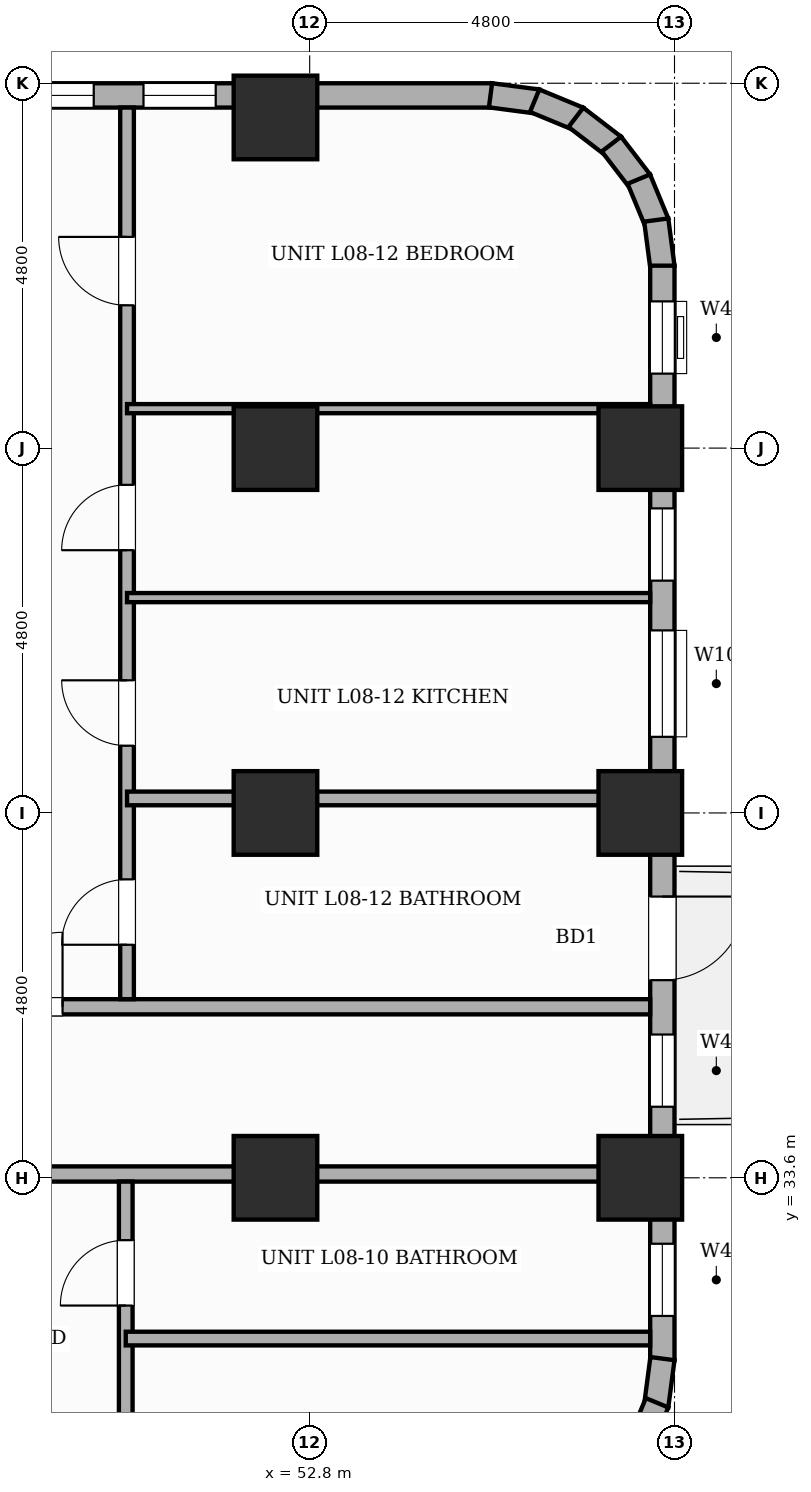
"""IFC4 building model, lengths in metres.
Left out: names, types, materials, properties, quantities, classifications, styles, units other than length and angle.
Written with IfcOpenShell. Run it as: python <this file> out.ifc"""

import sys

from ifc_helpers import new_model, si_unit, direction, frame, frame_2d, origin, origin_2d, place, context, subcontext, project, spatial, rectangle, extrude, element, fill, save


model = new_model("IFC4")
c1 = context("Model", 3, precision=1e-05, world=origin(), true_north=direction((0.0, 1.0)))
c2 = subcontext(c1, "Body", "Model", "MODEL_VIEW")
j1 = project(units=[si_unit("LENGTHUNIT", "METRE"), si_unit("PLANEANGLEUNIT", "RADIAN")], contexts=[c1])
p1 = place(None, origin())
s1 = spatial("IfcSite", under=j1, at=p1, CompositionType="ELEMENT")
p2 = place(p1, origin())
s2 = spatial("IfcBuilding", under=s1, at=p2, CompositionType="ELEMENT")
p3 = place(p2, frame((0.0, 0.0, 35.8)))
s3 = spatial("IfcBuildingStorey", under=s2, at=p3, CompositionType="ELEMENT", Elevation=35.8)
for number, where, z_axis, x_axis in (
    (1, (52.35, 33.6, 0.0), (0.0, 0.0, 1.0), (1.0, 0.0, 0.0)),
    (2, (52.35, 38.4, 0.0), (0.0, 0.0, 1.0), (1.0, 0.0, 0.0)),
    (3, (52.35, 43.2, 0.0), (0.0, 0.0, 1.0), (1.0, 0.0, 0.0)),
    (4, (52.35, 47.55, 0.0), (0.0, 0.0, 1.0), (1.0, 0.0, 0.0)),
    (5, (57.15, 33.6, 0.0), (0.0, 0.0, 1.0), (1.0, 0.0, 0.0)),
    (6, (57.15, 38.4, 0.0), (0.0, 0.0, 1.0), (1.0, 0.0, 0.0)),
    (7, (57.15, 43.2, 0.0), (0.0, 0.0, 1.0), (1.0, 0.0, 0.0)),
):
    element("IfcColumn", number, at=place(p3, frame(where, z_axis=z_axis, x_axis=x_axis)), inside=s3, PredefinedType="COLUMN", context=c2, shape_type="SweptSolid", body=[
        extrude(rectangle(XDim=1.1, YDim=1.1, at=origin_2d()), origin(), (0.0, 0.0, 1.0), 3.6),
    ])
p4 = place(p3, frame((7.2, 47.84, 0.0), z_axis=(0.0, 0.0, 1.0), x_axis=(1.0, 0.0, 0.0)))
e8 = element("IfcWall", 8, at=p4, inside=s3, PredefinedType="STANDARD", context=c2, shape_type="SweptSolid", body=[
    extrude(rectangle(XDim=48.0, YDim=0.32, at=frame_2d((24.0, 0.0))), origin(), (0.0, 0.0, 1.0), 2.53),
])
p5 = place(p4, frame((28.803, 0.0, 0.65)))
e9 = element("IfcOpeningElement", 9, at=p5, cuts=e8, PredefinedType="OPENING", context=c2, shape_type="SweptSolid", body=[
    extrude(rectangle(XDim=1.4, YDim=1.1, at=frame_2d((0.7, 0.55))), frame((0.0, 0.17, 0.0), z_axis=(0.0, -1.0, 0.0), x_axis=(1.0, 0.0, 0.0)), (0.0, 0.0, 1.0), 0.34),
])
p6 = place(p4, frame((43.414, 0.0, 0.45)))
e10 = element("IfcOpeningElement", 10, at=p6, cuts=e8, PredefinedType="OPENING", context=c2, shape_type="SweptSolid", body=[
    extrude(rectangle(XDim=0.95, YDim=1.8, at=frame_2d((0.475, 0.9))), frame((0.0, 0.17, 0.0), z_axis=(0.0, -1.0, 0.0), x_axis=(1.0, 0.0, 0.0)), (0.0, 0.0, 1.0), 0.34),
])
p7 = place(p4, frame((18.74, 0.0, 0.45)))
e11 = element("IfcOpeningElement", 11, at=p7, cuts=e8, PredefinedType="OPENING", context=c2, shape_type="SweptSolid", body=[
    extrude(rectangle(XDim=0.95, YDim=1.8, at=frame_2d((0.475, 0.9))), frame((0.0, 0.17, 0.0), z_axis=(0.0, -1.0, 0.0), x_axis=(1.0, 0.0, 0.0)), (0.0, 0.0, 1.0), 0.34),
])
p8 = place(p4, frame((37.825, 0.0, 0.65)))
e12 = element("IfcOpeningElement", 12, at=p8, cuts=e8, PredefinedType="OPENING", context=c2, shape_type="SweptSolid", body=[
    extrude(rectangle(XDim=1.4, YDim=1.1, at=frame_2d((0.7, 0.55))), frame((0.0, 0.17, 0.0), z_axis=(0.0, -1.0, 0.0), x_axis=(1.0, 0.0, 0.0)), (0.0, 0.0, 1.0), 0.34),
])
p9 = place(p4, frame((0.47, 0.0, 0.45)))
e13 = element("IfcOpeningElement", 13, at=p9, cuts=e8, PredefinedType="OPENING", context=c2, shape_type="SweptSolid", body=[
    extrude(rectangle(XDim=0.95, YDim=1.8, at=frame_2d((0.475, 0.9))), frame((0.0, 0.17, 0.0), z_axis=(0.0, -1.0, 0.0), x_axis=(1.0, 0.0, 0.0)), (0.0, 0.0, 1.0), 0.34),
])
p10 = place(p4, frame((5.265, 0.0, 0.45)))
e14 = element("IfcOpeningElement", 14, at=p10, cuts=e8, PredefinedType="OPENING", context=c2, shape_type="SweptSolid", body=[
    extrude(rectangle(XDim=0.95, YDim=1.8, at=frame_2d((0.475, 0.9))), frame((0.0, 0.17, 0.0), z_axis=(0.0, -1.0, 0.0), x_axis=(1.0, 0.0, 0.0)), (0.0, 0.0, 1.0), 0.34),
])
p11 = place(p4, frame((23.43, 0.0, 0.65)))
e15 = element("IfcOpeningElement", 15, at=p11, cuts=e8, PredefinedType="OPENING", context=c2, shape_type="SweptSolid", body=[
    extrude(rectangle(XDim=1.4, YDim=1.1, at=frame_2d((0.7, 0.55))), frame((0.0, 0.17, 0.0), z_axis=(0.0, -1.0, 0.0), x_axis=(1.0, 0.0, 0.0)), (0.0, 0.0, 1.0), 0.34),
])
p12 = place(p4, frame((41.809, 0.0, 0.45)))
e16 = element("IfcOpeningElement", 16, at=p12, cuts=e8, PredefinedType="OPENING", context=c2, shape_type="SweptSolid", body=[
    extrude(rectangle(XDim=0.95, YDim=1.8, at=frame_2d((0.475, 0.9))), frame((0.0, 0.17, 0.0), z_axis=(0.0, -1.0, 0.0), x_axis=(1.0, 0.0, 0.0)), (0.0, 0.0, 1.0), 0.34),
])
for number, where, z_axis, x_axis in (
    (17, (55.179, 47.841, 0.0), (0.0, 0.0, 1.0), (0.991, -0.131, 0.0)),
    (18, (55.76, 47.771, 0.0), (0.0, 0.0, 1.0), (0.924, -0.383, 0.0)),
):
    element("IfcWall", number, at=place(p3, frame(where, z_axis=z_axis, x_axis=x_axis)), inside=s3, PredefinedType="STANDARD", context=c2, shape_type="SweptSolid", body=[
        extrude(rectangle(XDim=0.626, YDim=0.32, at=frame_2d((0.313, 0.0))), origin(), (0.0, 0.0, 1.0), 3.35),
    ])
p13 = place(p3, frame((56.302, 47.552, 0.0), z_axis=(0.0, 0.0, 1.0), x_axis=(0.793549926411, -0.608505147302, 0.0)))
e19 = element("IfcWall", 19, at=p13, inside=s3, PredefinedType="STANDARD", context=c2, shape_type="SweptSolid", body=[
    extrude(rectangle(XDim=0.627, YDim=0.32, at=frame_2d((0.313, 0.0))), origin(), (0.0, 0.0, 1.0), 3.35),
])
for number, where, z_axis, x_axis in (
    (20, (56.77, 47.2, 0.0), (0.0, 0.0, 1.0), (0.609, -0.793, 0.0)),
    (21, (57.131, 46.739, 0.0), (0.0, 0.0, 1.0), (0.383, -0.924, 0.0)),
    (22, (57.36, 46.2, 0.0), (0.0, 0.0, 1.0), (0.131, -0.991, 0.0)),
):
    element("IfcWall", number, at=place(p3, frame(where, z_axis=z_axis, x_axis=x_axis)), inside=s3, PredefinedType="STANDARD", context=c2, shape_type="SweptSolid", body=[
        extrude(rectangle(XDim=0.626, YDim=0.32, at=frame_2d((0.313, 0.0))), origin(), (0.0, 0.0, 1.0), 3.35),
    ])
p14 = place(p3, frame((57.44, 45.6, 0.0), z_axis=(0.0, 0.0, 1.0), x_axis=(0.0, -1.0, 0.0)))
e23 = element("IfcWall", 23, at=p14, inside=s3, PredefinedType="STANDARD", context=c2, shape_type="SweptSolid", body=[
    extrude(rectangle(XDim=14.4, YDim=0.32, at=frame_2d((7.2, 0.0))), origin(), (0.0, 0.0, 1.0), 2.53),
])
p15 = place(p14, frame((8.3, 0.0, 0.0)))
e24 = element("IfcOpeningElement", 24, at=p15, cuts=e23, PredefinedType="OPENING", context=c2, shape_type="SweptSolid", body=[
    extrude(rectangle(XDim=1.1, YDim=2.15, at=frame_2d((0.55, 1.075))), frame((0.0, 0.17, 0.0), z_axis=(0.0, -1.0, 0.0), x_axis=(1.0, 0.0, 0.0)), (0.0, 0.0, 1.0), 0.34),
])
p16 = place(p14, frame((0.47, 0.0, 0.45)))
e25 = element("IfcOpeningElement", 25, at=p16, cuts=e23, PredefinedType="OPENING", context=c2, shape_type="SweptSolid", body=[
    extrude(rectangle(XDim=0.95, YDim=1.8, at=frame_2d((0.475, 0.9))), frame((0.0, 0.17, 0.0), z_axis=(0.0, -1.0, 0.0), x_axis=(1.0, 0.0, 0.0)), (0.0, 0.0, 1.0), 0.34),
])
p17 = place(p14, frame((10.115, 0.0, 0.45)))
e26 = element("IfcOpeningElement", 26, at=p17, cuts=e23, PredefinedType="OPENING", context=c2, shape_type="SweptSolid", body=[
    extrude(rectangle(XDim=0.95, YDim=1.8, at=frame_2d((0.475, 0.9))), frame((0.0, 0.17, 0.0), z_axis=(0.0, -1.0, 0.0), x_axis=(1.0, 0.0, 0.0)), (0.0, 0.0, 1.0), 0.34),
])
p18 = place(p14, frame((12.867, 0.0, 0.45)))
e27 = element("IfcOpeningElement", 27, at=p18, cuts=e23, PredefinedType="OPENING", context=c2, shape_type="SweptSolid", body=[
    extrude(rectangle(XDim=0.95, YDim=1.8, at=frame_2d((0.475, 0.9))), frame((0.0, 0.17, 0.0), z_axis=(0.0, -1.0, 0.0), x_axis=(1.0, 0.0, 0.0)), (0.0, 0.0, 1.0), 0.34),
])
p19 = place(p14, frame((4.799, 0.0, 0.65)))
e28 = element("IfcOpeningElement", 28, at=p19, cuts=e23, PredefinedType="OPENING", context=c2, shape_type="SweptSolid", body=[
    extrude(rectangle(XDim=1.4, YDim=1.1, at=frame_2d((0.7, 0.55))), frame((0.0, 0.17, 0.0), z_axis=(0.0, -1.0, 0.0), x_axis=(1.0, 0.0, 0.0)), (0.0, 0.0, 1.0), 0.34),
])
p20 = place(p14, frame((3.194, 0.0, 0.45)))
e29 = element("IfcOpeningElement", 29, at=p20, cuts=e23, PredefinedType="OPENING", context=c2, shape_type="SweptSolid", body=[
    extrude(rectangle(XDim=0.95, YDim=1.8, at=frame_2d((0.475, 0.9))), frame((0.0, 0.17, 0.0), z_axis=(0.0, -1.0, 0.0), x_axis=(1.0, 0.0, 0.0)), (0.0, 0.0, 1.0), 0.34),
])
p21 = place(p3, frame((57.441, 31.221, 0.0), z_axis=(0.0, 0.0, 1.0), x_axis=(-0.130504898859, -0.991447664465, 0.0)))
e30 = element("IfcWall", 30, at=p21, inside=s3, PredefinedType="STANDARD", context=c2, shape_type="SweptSolid", body=[
    extrude(rectangle(XDim=0.627, YDim=0.32, at=frame_2d((0.313, 0.0))), origin(), (0.0, 0.0, 1.0), 3.35),
])
p22 = place(p3, frame((57.37, 30.64, 0.0), z_axis=(0.0, 0.0, 1.0), x_axis=(-0.382787856107, -0.923836271867, 0.0)))
e31 = element("IfcWall", 31, at=p22, inside=s3, PredefinedType="STANDARD", context=c2, shape_type="SweptSolid", body=[
    extrude(rectangle(XDim=0.626, YDim=0.32, at=frame_2d((0.313, 0.0))), origin(), (0.0, 0.0, 1.0), 3.35),
])
p23 = place(p3, frame((22.75, 33.65, 0.0), z_axis=(0.0, 0.0, 1.0), x_axis=(1.0, 0.0, 0.0)))
e32 = element("IfcWall", 32, at=p23, inside=s3, PredefinedType="PARTITIONING", context=c2, shape_type="SweptSolid", body=[
    extrude(rectangle(XDim=34.53, YDim=0.2, at=frame_2d((17.265, 0.0))), origin(), (0.0, 0.0, 1.0), 2.53),
])
p24 = place(p23, frame((6.491, 0.0, 0.0)))
e33 = element("IfcOpeningElement", 33, at=p24, cuts=e32, PredefinedType="OPENING", context=c2, shape_type="SweptSolid", body=[
    extrude(rectangle(XDim=0.98, YDim=2.18, at=frame_2d((0.49, 1.09))), frame((0.0, 0.11, 0.0), z_axis=(0.0, -1.0, 0.0), x_axis=(1.0, 0.0, 0.0)), (0.0, 0.0, 1.0), 0.22),
])
p25 = place(p23, frame((13.406, 0.0, 0.0)))
e34 = element("IfcOpeningElement", 34, at=p25, cuts=e32, PredefinedType="OPENING", context=c2, shape_type="SweptSolid", body=[
    extrude(rectangle(XDim=0.98, YDim=2.18, at=frame_2d((0.49, 1.09))), frame((0.0, 0.11, 0.0), z_axis=(0.0, -1.0, 0.0), x_axis=(1.0, 0.0, 0.0)), (0.0, 0.0, 1.0), 0.22),
])
p26 = place(p23, frame((24.09, 0.0, 0.0)))
e35 = element("IfcOpeningElement", 35, at=p26, cuts=e32, PredefinedType="OPENING", context=c2, shape_type="SweptSolid", body=[
    extrude(rectangle(XDim=0.98, YDim=2.18, at=frame_2d((0.49, 1.09))), frame((0.0, 0.11, 0.0), z_axis=(0.0, -1.0, 0.0), x_axis=(1.0, 0.0, 0.0)), (0.0, 0.0, 1.0), 0.22),
])
p27 = place(p3, frame((44.02, 35.85, 0.0), z_axis=(0.0, 0.0, 1.0), x_axis=(1.0, 0.0, 0.0)))
e36 = element("IfcWall", 36, at=p27, inside=s3, PredefinedType="PARTITIONING", context=c2, shape_type="SweptSolid", body=[
    extrude(rectangle(XDim=13.26, YDim=0.2, at=frame_2d((6.63, 0.0))), origin(), (0.0, 0.0, 1.0), 3.35),
])
p28 = place(p27, frame((4.549, 0.0, 0.0)))
e37 = element("IfcOpeningElement", 37, at=p28, cuts=e36, PredefinedType="OPENING", context=c2, shape_type="SweptSolid", body=[
    extrude(rectangle(XDim=0.98, YDim=2.18, at=frame_2d((0.49, 1.09))), frame((0.0, 0.11, 0.0), z_axis=(0.0, -1.0, 0.0), x_axis=(1.0, 0.0, 0.0)), (0.0, 0.0, 1.0), 0.22),
])
p29 = place(p3, frame((50.38, 29.12, 0.0), z_axis=(0.0, 0.0, 1.0), x_axis=(0.0, 1.0, 0.0)))
e38 = element("IfcWall", 38, at=p29, inside=s3, PredefinedType="PLUMBINGWALL", context=c2, shape_type="SweptSolid", body=[
    extrude(rectangle(XDim=4.43, YDim=0.18, at=frame_2d((2.215, 0.0))), origin(), (0.0, 0.0, 1.0), 3.35),
])
p30 = place(p29, frame((0.459, 0.0, 0.0)))
e39 = element("IfcOpeningElement", 39, at=p30, cuts=e38, PredefinedType="OPENING", context=c2, shape_type="SweptSolid", body=[
    extrude(rectangle(XDim=0.86, YDim=2.1, at=frame_2d((0.43, 1.05))), frame((0.0, 0.1, 0.0), z_axis=(0.0, -1.0, 0.0), x_axis=(1.0, 0.0, 0.0)), (0.0, 0.0, 1.0), 0.2),
])
p31 = place(p29, frame((2.799, 0.0, 0.0)))
e40 = element("IfcOpeningElement", 40, at=p31, cuts=e38, PredefinedType="OPENING", context=c2, shape_type="SweptSolid", body=[
    extrude(rectangle(XDim=0.86, YDim=2.1, at=frame_2d((0.43, 1.05))), frame((0.0, 0.1, 0.0), z_axis=(0.0, -1.0, 0.0), x_axis=(1.0, 0.0, 0.0)), (0.0, 0.0, 1.0), 0.2),
])
p32 = place(p3, frame((50.38, 31.485, 0.0), z_axis=(0.0, 0.0, 1.0), x_axis=(1.0, 0.0, 0.0)))
e41 = element("IfcWall", 41, at=p32, inside=s3, PredefinedType="PLUMBINGWALL", context=c2, shape_type="SweptSolid", body=[
    extrude(rectangle(XDim=6.9, YDim=0.18, at=frame_2d((3.45, 0.0))), origin(), (0.0, 0.0, 1.0), 3.35),
])
p33 = place(p3, frame((50.397, 35.95, 0.0), z_axis=(0.0, 0.0, 1.0), x_axis=(0.0, 1.0, 0.0)))
e42 = element("IfcWall", 42, at=p33, inside=s3, PredefinedType="PLUMBINGWALL", context=c2, shape_type="SweptSolid", body=[
    extrude(rectangle(XDim=11.73, YDim=0.18, at=frame_2d((5.865, 0.0))), origin(), (0.0, 0.0, 1.0), 3.35),
])
p34 = place(p33, frame((0.716, 0.0, 0.0)))
e43 = element("IfcOpeningElement", 43, at=p34, cuts=e42, PredefinedType="OPENING", context=c2, shape_type="SweptSolid", body=[
    extrude(rectangle(XDim=0.86, YDim=2.1, at=frame_2d((0.43, 1.05))), frame((0.0, 0.1, 0.0), z_axis=(0.0, -1.0, 0.0), x_axis=(1.0, 0.0, 0.0)), (0.0, 0.0, 1.0), 0.2),
])
p35 = place(p33, frame((3.335, 0.0, 0.0)))
e44 = element("IfcOpeningElement", 44, at=p35, cuts=e42, PredefinedType="OPENING", context=c2, shape_type="SweptSolid", body=[
    extrude(rectangle(XDim=0.86, YDim=2.1, at=frame_2d((0.43, 1.05))), frame((0.0, 0.1, 0.0), z_axis=(0.0, -1.0, 0.0), x_axis=(1.0, 0.0, 0.0)), (0.0, 0.0, 1.0), 0.2),
])
p36 = place(p33, frame((5.907, 0.0, 0.0)))
e45 = element("IfcOpeningElement", 45, at=p36, cuts=e42, PredefinedType="OPENING", context=c2, shape_type="SweptSolid", body=[
    extrude(rectangle(XDim=0.86, YDim=2.1, at=frame_2d((0.43, 1.05))), frame((0.0, 0.1, 0.0), z_axis=(0.0, -1.0, 0.0), x_axis=(1.0, 0.0, 0.0)), (0.0, 0.0, 1.0), 0.2),
])
p37 = place(p33, frame((9.128, 0.0, 0.0)))
e46 = element("IfcOpeningElement", 46, at=p37, cuts=e42, PredefinedType="OPENING", context=c2, shape_type="SweptSolid", body=[
    extrude(rectangle(XDim=0.9, YDim=2.15, at=frame_2d((0.45, 1.075))), frame((0.0, 0.1, 0.0), z_axis=(0.0, -1.0, 0.0), x_axis=(1.0, 0.0, 0.0)), (0.0, 0.0, 1.0), 0.2),
])
p38 = place(p3, frame((50.397, 38.591, 0.0), z_axis=(0.0, 0.0, 1.0), x_axis=(1.0, 0.0, 0.0)))
e47 = element("IfcWall", 47, at=p38, inside=s3, PredefinedType="PLUMBINGWALL", context=c2, shape_type="SweptSolid", body=[
    extrude(rectangle(XDim=6.883, YDim=0.18, at=frame_2d((3.441, 0.0))), origin(), (0.0, 0.0, 1.0), 2.53),
])
for number, where, z_axis, x_axis in (
    (48, (50.397, 41.233, 0.0), (0.0, 0.0, 1.0), (1.0, 0.0, 0.0)),
    (49, (50.397, 43.719, 0.0), (0.0, 0.0, 1.0), (1.0, 0.0, 0.0)),
):
    element("IfcWall", number, at=place(p3, frame(where, z_axis=z_axis, x_axis=x_axis)), inside=s3, PredefinedType="PARTITIONING", context=c2, shape_type="SweptSolid", body=[
        extrude(rectangle(XDim=6.883, YDim=0.12, at=frame_2d((3.441, 0.0))), origin(), (0.0, 0.0, 1.0), 3.35),
    ])
p39 = place(p6, origin())
e50 = element("IfcWindow", 50, at=p39, inside=s3, PartitioningType="SINGLE_PANEL", PredefinedType="WINDOW", context=c2, shape_type="SweptSolid", body=[
    extrude(rectangle(XDim=0.95, YDim=1.8, at=frame_2d((0.475, 0.9))), frame((0.0, 0.03, 0.0), z_axis=(0.0, -1.0, 0.0), x_axis=(1.0, 0.0, 0.0)), (0.0, 0.0, 1.0), 0.06),
])
fill(e10, e50)
p40 = place(p12, origin())
e51 = element("IfcWindow", 51, at=p40, inside=s3, PartitioningType="SINGLE_PANEL", PredefinedType="WINDOW", context=c2, shape_type="SweptSolid", body=[
    extrude(rectangle(XDim=0.95, YDim=1.8, at=frame_2d((0.475, 0.9))), frame((0.0, 0.03, 0.0), z_axis=(0.0, -1.0, 0.0), x_axis=(1.0, 0.0, 0.0)), (0.0, 0.0, 1.0), 0.06),
])
fill(e16, e51)
p41 = place(p15, origin())
e52 = element("IfcDoor", 52, at=p41, inside=s3, OperationType="SINGLE_SWING_LEFT", PredefinedType="DOOR", context=c2, shape_type="SweptSolid", body=[
    extrude(rectangle(XDim=1.1, YDim=2.15, at=frame_2d((0.55, 1.075))), frame((0.0, 0.025, 0.0), z_axis=(0.0, -1.0, 0.0), x_axis=(1.0, 0.0, 0.0)), (0.0, 0.0, 1.0), 0.05),
])
fill(e24, e52)
p42 = place(p16, origin())
e53 = element("IfcWindow", 53, at=p42, inside=s3, PartitioningType="SINGLE_PANEL", PredefinedType="WINDOW", context=c2, shape_type="SweptSolid", body=[
    extrude(rectangle(XDim=0.95, YDim=1.8, at=frame_2d((0.475, 0.9))), frame((0.0, 0.03, 0.0), z_axis=(0.0, -1.0, 0.0), x_axis=(1.0, 0.0, 0.0)), (0.0, 0.0, 1.0), 0.06),
])
fill(e25, e53)
p43 = place(p17, origin())
e54 = element("IfcWindow", 54, at=p43, inside=s3, PartitioningType="SINGLE_PANEL", PredefinedType="WINDOW", context=c2, shape_type="SweptSolid", body=[
    extrude(rectangle(XDim=0.95, YDim=1.8, at=frame_2d((0.475, 0.9))), frame((0.0, 0.03, 0.0), z_axis=(0.0, -1.0, 0.0), x_axis=(1.0, 0.0, 0.0)), (0.0, 0.0, 1.0), 0.06),
])
fill(e26, e54)
p44 = place(p18, origin())
e55 = element("IfcWindow", 55, at=p44, inside=s3, PartitioningType="SINGLE_PANEL", PredefinedType="WINDOW", context=c2, shape_type="SweptSolid", body=[
    extrude(rectangle(XDim=0.95, YDim=1.8, at=frame_2d((0.475, 0.9))), frame((0.0, 0.03, 0.0), z_axis=(0.0, -1.0, 0.0), x_axis=(1.0, 0.0, 0.0)), (0.0, 0.0, 1.0), 0.06),
])
fill(e27, e55)
p45 = place(p19, origin())
e56 = element("IfcWindow", 56, at=p45, inside=s3, PartitioningType="SINGLE_PANEL", PredefinedType="WINDOW", context=c2, shape_type="SweptSolid", body=[
    extrude(rectangle(XDim=1.4, YDim=1.1, at=frame_2d((0.7, 0.55))), frame((0.0, 0.03, 0.0), z_axis=(0.0, -1.0, 0.0), x_axis=(1.0, 0.0, 0.0)), (0.0, 0.0, 1.0), 0.06),
])
fill(e28, e56)
p46 = place(p20, origin())
e57 = element("IfcWindow", 57, at=p46, inside=s3, PartitioningType="SINGLE_PANEL", PredefinedType="WINDOW", context=c2, shape_type="SweptSolid", body=[
    extrude(rectangle(XDim=0.95, YDim=1.8, at=frame_2d((0.475, 0.9))), frame((0.0, 0.03, 0.0), z_axis=(0.0, -1.0, 0.0), x_axis=(1.0, 0.0, 0.0)), (0.0, 0.0, 1.0), 0.06),
])
fill(e29, e57)
p47 = place(p31, origin())
e58 = element("IfcDoor", 58, at=p47, inside=s3, OperationType="SINGLE_SWING_LEFT", PredefinedType="DOOR", context=c2, shape_type="SweptSolid", body=[
    extrude(rectangle(XDim=0.86, YDim=2.1, at=frame_2d((0.43, 1.05))), frame((0.0, 0.025, 0.0), z_axis=(0.0, -1.0, 0.0), x_axis=(1.0, 0.0, 0.0)), (0.0, 0.0, 1.0), 0.05),
])
fill(e40, e58)
p48 = place(p28, origin())
e59 = element("IfcDoor", 59, at=p48, inside=s3, OperationType="SINGLE_SWING_RIGHT", PredefinedType="DOOR", context=c2, shape_type="SweptSolid", body=[
    extrude(rectangle(XDim=0.98, YDim=2.18, at=frame_2d((0.49, 1.09))), frame((0.0, 0.025, 0.0), z_axis=(0.0, -1.0, 0.0), x_axis=(1.0, 0.0, 0.0)), (0.0, 0.0, 1.0), 0.05),
])
fill(e37, e59)
p49 = place(p34, origin())
e60 = element("IfcDoor", 60, at=p49, inside=s3, OperationType="SINGLE_SWING_LEFT", PredefinedType="DOOR", context=c2, shape_type="SweptSolid", body=[
    extrude(rectangle(XDim=0.86, YDim=2.1, at=frame_2d((0.43, 1.05))), frame((0.0, 0.025, 0.0), z_axis=(0.0, -1.0, 0.0), x_axis=(1.0, 0.0, 0.0)), (0.0, 0.0, 1.0), 0.05),
])
fill(e43, e60)
p50 = place(p35, origin())
e61 = element("IfcDoor", 61, at=p50, inside=s3, OperationType="SINGLE_SWING_RIGHT", PredefinedType="DOOR", context=c2, shape_type="SweptSolid", body=[
    extrude(rectangle(XDim=0.86, YDim=2.1, at=frame_2d((0.43, 1.05))), frame((0.0, 0.025, 0.0), z_axis=(0.0, -1.0, 0.0), x_axis=(1.0, 0.0, 0.0)), (0.0, 0.0, 1.0), 0.05),
])
fill(e44, e61)
p51 = place(p36, origin())
e62 = element("IfcDoor", 62, at=p51, inside=s3, OperationType="SINGLE_SWING_LEFT", PredefinedType="DOOR", context=c2, shape_type="SweptSolid", body=[
    extrude(rectangle(XDim=0.86, YDim=2.1, at=frame_2d((0.43, 1.05))), frame((0.0, 0.025, 0.0), z_axis=(0.0, -1.0, 0.0), x_axis=(1.0, 0.0, 0.0)), (0.0, 0.0, 1.0), 0.05),
])
fill(e45, e62)
p52 = place(p37, origin())
e63 = element("IfcDoor", 63, at=p52, inside=s3, OperationType="SINGLE_SWING_RIGHT", PredefinedType="DOOR", context=c2, shape_type="SweptSolid", body=[
    extrude(rectangle(XDim=0.9, YDim=2.15, at=frame_2d((0.45, 1.075))), frame((0.0, 0.025, 0.0), z_axis=(0.0, -1.0, 0.0), x_axis=(1.0, 0.0, 0.0)), (0.0, 0.0, 1.0), 0.05),
])
fill(e46, e63)
save(model, sys.argv[1])
